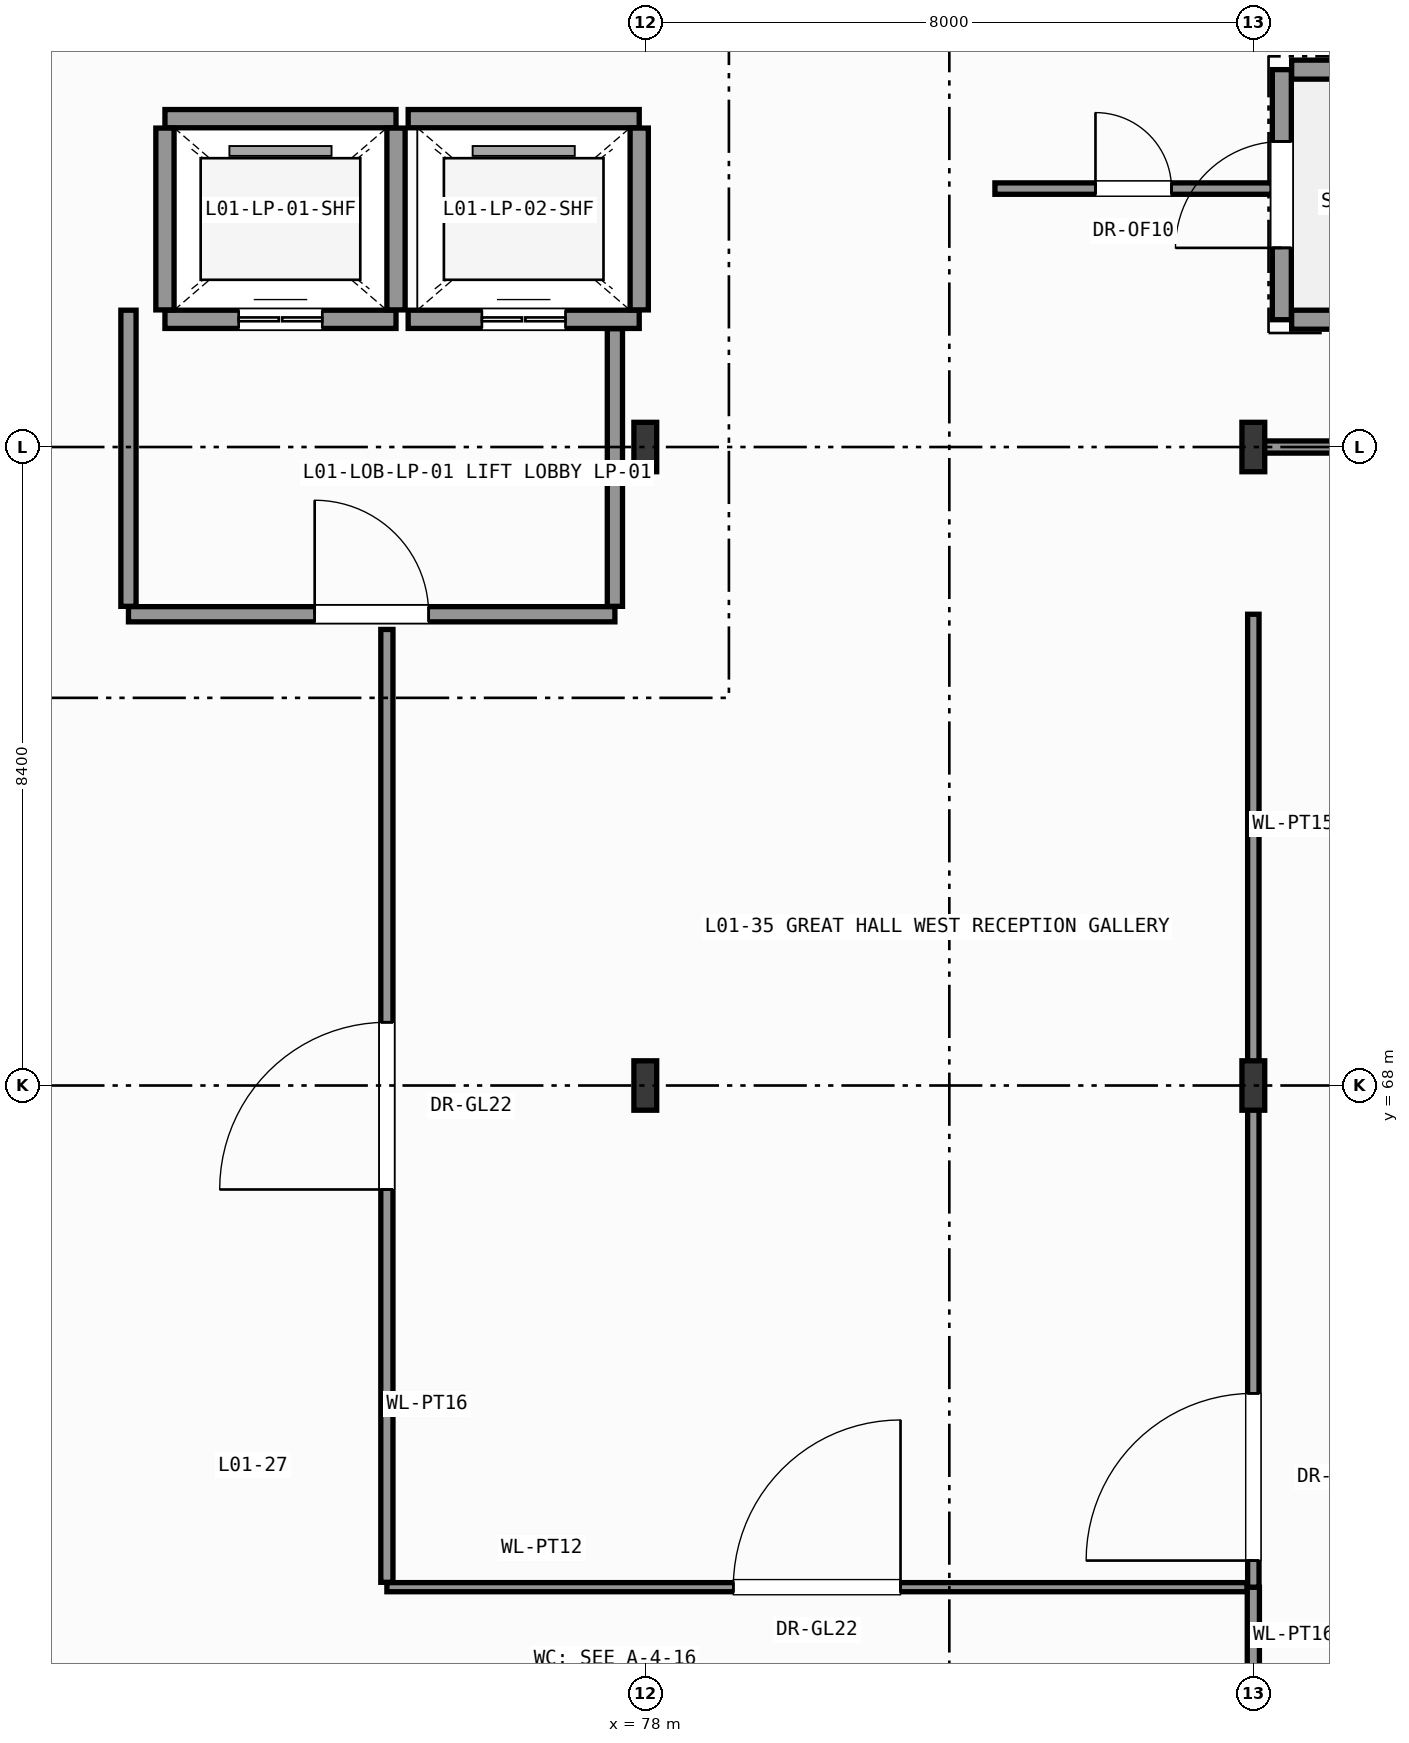
"""IFC4 building model, lengths in metres.
Left out: names, types, materials, properties, quantities, classifications, styles, units other than length and angle.
Written with IfcOpenShell. Run it as: python <this file> out.ifc"""

import sys

from ifc_helpers import new_model, si_unit, direction, frame, frame_2d, origin, origin_2d, place, context, subcontext, project, spatial, rectangle, i_section, extrude, element, fill, save


model = new_model("IFC4")
c1 = context("Model", 3, precision=1e-05, world=origin(), true_north=direction((0.0, 1.0)))
c2 = subcontext(c1, "Body", "Model", "MODEL_VIEW")
j1 = project(units=[si_unit("LENGTHUNIT", "METRE"), si_unit("PLANEANGLEUNIT", "RADIAN")], contexts=[c1])
p1 = place(None, origin())
s1 = spatial("IfcSite", under=j1, at=p1, CompositionType="ELEMENT")
p2 = place(p1, origin())
s2 = spatial("IfcBuilding", under=s1, at=p2, CompositionType="ELEMENT")
p3 = place(p2, origin())
s3 = spatial("IfcBuildingStorey", under=s2, at=p3, CompositionType="ELEMENT", Elevation=0.0)
for number, where, z_axis, x_axis in (
    (1, (78.0, 68.0, 0.0), (0.0, 0.0, 1.0), (1.0, 0.0, 0.0)),
    (2, (78.0, 76.4, 0.0), (0.0, 0.0, 1.0), (1.0, 0.0, 0.0)),
    (3, (86.0, 68.0, 0.0), (0.0, 0.0, 1.0), (1.0, 0.0, 0.0)),
    (4, (86.0, 76.4, 0.0), (0.0, 0.0, 1.0), (1.0, 0.0, 0.0)),
):
    element("IfcColumn", number, at=place(p3, frame(where, z_axis=z_axis, x_axis=x_axis)), inside=s3, PredefinedType="COLUMN", context=c2, shape_type="SweptSolid", body=[
        extrude(i_section(OverallWidth=0.3, OverallDepth=0.65, WebThickness=0.016, FlangeThickness=0.031, FilletRadius=0.027, at=origin_2d()), origin(), (0.0, 0.0, 1.0), 7.8),
    ])
p4 = place(p3, frame((86.375, 78.075, 0.0), z_axis=(0.0, 0.0, 1.0), x_axis=(0.0, 1.0, 0.0)))
e5 = element("IfcWall", 5, at=p4, inside=s3, PredefinedType="SHEAR", context=c2, shape_type="SweptSolid", body=[
    extrude(rectangle(XDim=3.29, YDim=0.25, at=frame_2d((1.645, 0.0))), origin(), (0.0, 0.0, 1.0), 7.54),
])
p5 = place(p4, frame((0.945, 0.0, 0.0)))
e6 = element("IfcOpeningElement", 6, at=p5, cuts=e5, PredefinedType="OPENING", context=c2, shape_type="SweptSolid", body=[
    extrude(rectangle(XDim=1.4, YDim=2.2, at=frame_2d((0.7, 1.1))), frame((0.0, 0.135, 0.0), z_axis=(0.0, -1.0, 0.0), x_axis=(1.0, 0.0, 0.0)), (0.0, 0.0, 1.0), 0.27),
])
for number, where, z_axis, x_axis in (
    (7, (86.504, 78.075, 0.0), (0.0, 0.0, 1.0), (1.0, 0.0, 0.0)),
    (8, (86.504, 81.365, 0.0), (0.0, 0.0, 1.0), (1.0, 0.0, 0.0)),
):
    element("IfcWall", number, at=place(p3, frame(where, z_axis=z_axis, x_axis=x_axis)), inside=s3, PredefinedType="SHEAR", context=c2, shape_type="SweptSolid", body=[
        extrude(rectangle(XDim=6.892, YDim=0.25, at=frame_2d((3.446, 0.0))), origin(), (0.0, 0.0, 1.0), 7.54),
    ])
p6 = place(p3, frame((71.68, 78.08, 0.0), z_axis=(0.0, 0.0, 1.0), x_axis=(1.0, 0.0, 0.0)))
e9 = element("IfcWall", 9, at=p6, inside=s3, PredefinedType="SHEAR", context=c2, shape_type="SweptSolid", body=[
    extrude(rectangle(XDim=3.04, YDim=0.24, at=frame_2d((1.52, 0.0))), origin(), (0.0, 0.0, 1.0), 7.54),
])
p7 = place(p6, frame((0.97, 0.0, 0.0)))
e10 = element("IfcOpeningElement", 10, at=p7, cuts=e9, PredefinedType="OPENING", context=c2, shape_type="SweptSolid", body=[
    extrude(rectangle(XDim=1.1, YDim=2.2, at=frame_2d((0.55, 1.1))), frame((0.0, 0.13, 0.0), z_axis=(0.0, -1.0, 0.0), x_axis=(1.0, 0.0, 0.0)), (0.0, 0.0, 1.0), 0.26),
])
p8 = place(p3, frame((71.68, 80.72, 0.0), z_axis=(0.0, 0.0, 1.0), x_axis=(1.0, 0.0, 0.0)))
e11 = element("IfcWall", 11, at=p8, inside=s3, PredefinedType="SHEAR", context=c2, shape_type="SweptSolid", body=[
    extrude(rectangle(XDim=3.04, YDim=0.24, at=frame_2d((1.52, 0.0))), origin(), (0.0, 0.0, 1.0), 7.54),
])
for number, where, z_axis, x_axis in (
    (12, (71.68, 78.204, 0.0), (0.0, 0.0, 1.0), (0.0, 1.0, 0.0)),
    (13, (74.72, 78.204, 0.0), (0.0, 0.0, 1.0), (0.0, 1.0, 0.0)),
):
    element("IfcWall", number, at=place(p3, frame(where, z_axis=z_axis, x_axis=x_axis)), inside=s3, PredefinedType="SHEAR", context=c2, shape_type="SweptSolid", body=[
        extrude(rectangle(XDim=2.392, YDim=0.24, at=frame_2d((1.196, 0.0))), origin(), (0.0, 0.0, 1.0), 7.54),
    ])
p9 = place(p3, frame((74.88, 78.08, 0.0), z_axis=(0.0, 0.0, 1.0), x_axis=(1.0, 0.0, 0.0)))
e14 = element("IfcWall", 14, at=p9, inside=s3, PredefinedType="SHEAR", context=c2, shape_type="SweptSolid", body=[
    extrude(rectangle(XDim=3.04, YDim=0.24, at=frame_2d((1.52, 0.0))), origin(), (0.0, 0.0, 1.0), 7.54),
])
p10 = place(p9, frame((0.97, 0.0, 0.0)))
e15 = element("IfcOpeningElement", 15, at=p10, cuts=e14, PredefinedType="OPENING", context=c2, shape_type="SweptSolid", body=[
    extrude(rectangle(XDim=1.1, YDim=2.2, at=frame_2d((0.55, 1.1))), frame((0.0, 0.13, 0.0), z_axis=(0.0, -1.0, 0.0), x_axis=(1.0, 0.0, 0.0)), (0.0, 0.0, 1.0), 0.26),
])
p11 = place(p3, frame((74.88, 80.72, 0.0), z_axis=(0.0, 0.0, 1.0), x_axis=(1.0, 0.0, 0.0)))
e16 = element("IfcWall", 16, at=p11, inside=s3, PredefinedType="SHEAR", context=c2, shape_type="SweptSolid", body=[
    extrude(rectangle(XDim=3.04, YDim=0.24, at=frame_2d((1.52, 0.0))), origin(), (0.0, 0.0, 1.0), 7.54),
])
p12 = place(p3, frame((77.92, 78.204, 0.0), z_axis=(0.0, 0.0, 1.0), x_axis=(0.0, 1.0, 0.0)))
e17 = element("IfcWall", 17, at=p12, inside=s3, PredefinedType="SHEAR", context=c2, shape_type="SweptSolid", body=[
    extrude(rectangle(XDim=2.392, YDim=0.24, at=frame_2d((1.196, 0.0))), origin(), (0.0, 0.0, 1.0), 7.54),
])
p13 = place(p3, frame((71.2, 74.2, 0.0), z_axis=(0.0, 0.0, 1.0), x_axis=(1.0, 0.0, 0.0)))
e18 = element("IfcWall", 18, at=p13, inside=s3, PredefinedType="PARTITIONING", context=c2, shape_type="SweptSolid", body=[
    extrude(rectangle(XDim=6.4, YDim=0.2, at=frame_2d((3.2, 0.0))), origin(), (0.0, 0.0, 1.0), 7.54),
])
p14 = place(p13, frame((2.45, 0.0, 0.0)))
e19 = element("IfcOpeningElement", 19, at=p14, cuts=e18, PredefinedType="OPENING", context=c2, shape_type="SweptSolid", body=[
    extrude(rectangle(XDim=1.5, YDim=2.2, at=frame_2d((0.75, 1.1))), frame((0.0, 0.11, 0.0), z_axis=(0.0, -1.0, 0.0), x_axis=(1.0, 0.0, 0.0)), (0.0, 0.0, 1.0), 0.22),
])
p15 = place(p3, frame((71.2, 74.304, 0.0), z_axis=(0.0, 0.0, 1.0), x_axis=(0.0, 1.0, 0.0)))
e20 = element("IfcWall", 20, at=p15, inside=s3, PredefinedType="PARTITIONING", context=c2, shape_type="SweptSolid", body=[
    extrude(rectangle(XDim=3.896, YDim=0.2, at=frame_2d((1.948, 0.0))), origin(), (0.0, 0.0, 1.0), 7.54),
])
p16 = place(p3, frame((77.6, 74.304, 0.0), z_axis=(0.0, 0.0, 1.0), x_axis=(0.0, 1.0, 0.0)))
e21 = element("IfcWall", 21, at=p16, inside=s3, PredefinedType="PARTITIONING", context=c2, shape_type="SweptSolid", body=[
    extrude(rectangle(XDim=3.652, YDim=0.2, at=frame_2d((1.826, 0.0))), origin(), (0.0, 0.0, 1.0), 7.54),
])
p17 = place(p3, frame((86.0, 59.6, 0.0), z_axis=(0.0, 0.0, 1.0), x_axis=(0.0, 1.0, 0.0)))
e22 = element("IfcWall", 22, at=p17, inside=s3, PredefinedType="PARTITIONING", context=c2, shape_type="SweptSolid", body=[
    extrude(rectangle(XDim=1.8, YDim=0.16, at=frame_2d((0.9, 0.0))), origin(), (0.0, 0.0, 1.0), 7.085),
])
p18 = place(p3, frame((86.0, 76.4, 0.0), z_axis=(0.0, 0.0, 1.0), x_axis=(1.0, 0.0, 0.0)))
e23 = element("IfcWall", 23, at=p18, inside=s3, PredefinedType="PARTITIONING", context=c2, shape_type="SweptSolid", body=[
    extrude(rectangle(XDim=23.936, YDim=0.16, at=frame_2d((11.968, 0.0))), origin(), (0.0, 0.0, 1.0), 7.135),
])
p19 = place(p18, frame((10.868, 0.0, 0.0)))
e24 = element("IfcOpeningElement", 24, at=p19, cuts=e23, PredefinedType="OPENING", context=c2, shape_type="SweptSolid", body=[
    extrude(rectangle(XDim=2.2, YDim=2.6, at=frame_2d((1.1, 1.3))), frame((0.0, 0.09, 0.0), z_axis=(0.0, -1.0, 0.0), x_axis=(1.0, 0.0, 0.0)), (0.0, 0.0, 1.0), 0.18),
])
p20 = place(p3, frame((86.0, 61.4, 0.0), z_axis=(0.0, 0.0, 1.0), x_axis=(0.0, 1.0, 0.0)))
e25 = element("IfcWall", 25, at=p20, inside=s3, PredefinedType="PARTITIONING", context=c2, shape_type="SweptSolid", body=[
    extrude(rectangle(XDim=12.8, YDim=0.15, at=frame_2d((6.4, 0.0))), origin(), (0.0, 0.0, 1.0), 7.085),
])
p21 = place(p20, frame((0.35, 0.0, 0.0)))
e26 = element("IfcOpeningElement", 26, at=p21, cuts=e25, PredefinedType="OPENING", context=c2, shape_type="SweptSolid", body=[
    extrude(rectangle(XDim=2.2, YDim=2.6, at=frame_2d((1.1, 1.3))), frame((0.0, 0.085, 0.0), z_axis=(0.0, -1.0, 0.0), x_axis=(1.0, 0.0, 0.0)), (0.0, 0.0, 1.0), 0.17),
])
p22 = place(p3, frame((74.6, 61.4, 0.0), z_axis=(0.0, 0.0, 1.0), x_axis=(1.0, 0.0, 0.0)))
e27 = element("IfcWall", 27, at=p22, inside=s3, PredefinedType="PARTITIONING", context=c2, shape_type="SweptSolid", body=[
    extrude(rectangle(XDim=11.316, YDim=0.12, at=frame_2d((5.658, 0.0))), origin(), (0.0, 0.0, 1.0), 7.54),
])
p23 = place(p22, frame((4.558, 0.0, 0.0)))
e28 = element("IfcOpeningElement", 28, at=p23, cuts=e27, PredefinedType="OPENING", context=c2, shape_type="SweptSolid", body=[
    extrude(rectangle(XDim=2.2, YDim=2.6, at=frame_2d((1.1, 1.3))), frame((0.0, 0.07, 0.0), z_axis=(0.0, -1.0, 0.0), x_axis=(1.0, 0.0, 0.0)), (0.0, 0.0, 1.0), 0.14),
])
p24 = place(p3, frame((74.6, 61.464, 0.0), z_axis=(0.0, 0.0, 1.0), x_axis=(0.0, 1.0, 0.0)))
e29 = element("IfcWall", 29, at=p24, inside=s3, PredefinedType="PARTITIONING", context=c2, shape_type="SweptSolid", body=[
    extrude(rectangle(XDim=12.536, YDim=0.16, at=frame_2d((6.268, 0.0))), origin(), (0.0, 0.0, 1.0), 7.54),
])
p25 = place(p24, frame((5.168, 0.0, 0.0)))
e30 = element("IfcOpeningElement", 30, at=p25, cuts=e29, PredefinedType="OPENING", context=c2, shape_type="SweptSolid", body=[
    extrude(rectangle(XDim=2.2, YDim=2.6, at=frame_2d((1.1, 1.3))), frame((0.0, 0.09, 0.0), z_axis=(0.0, -1.0, 0.0), x_axis=(1.0, 0.0, 0.0)), (0.0, 0.0, 1.0), 0.18),
])
p26 = place(p3, frame((82.6, 79.8, 0.0), z_axis=(0.0, 0.0, 1.0), x_axis=(1.0, 0.0, 0.0)))
e31 = element("IfcWall", 31, at=p26, inside=s3, PredefinedType="PARTITIONING", context=c2, shape_type="SweptSolid", body=[
    extrude(rectangle(XDim=3.646, YDim=0.15, at=frame_2d((1.823, 0.0))), origin(), (0.0, 0.0, 1.0), 7.195),
])
p27 = place(p26, frame((1.323, 0.0, 0.0)))
e32 = element("IfcOpeningElement", 32, at=p27, cuts=e31, PredefinedType="OPENING", context=c2, shape_type="SweptSolid", body=[
    extrude(rectangle(XDim=1.0, YDim=2.15, at=frame_2d((0.5, 1.075))), frame((0.0, 0.085, 0.0), z_axis=(0.0, -1.0, 0.0), x_axis=(1.0, 0.0, 0.0)), (0.0, 0.0, 1.0), 0.17),
])
p28 = place(p5, origin())
e33 = element("IfcDoor", 33, at=p28, inside=s3, OperationType="SINGLE_SWING_LEFT", PredefinedType="DOOR", context=c2, shape_type="SweptSolid", body=[
    extrude(rectangle(XDim=1.4, YDim=2.2, at=frame_2d((0.7, 1.1))), frame((0.0, 0.025, 0.0), z_axis=(0.0, -1.0, 0.0), x_axis=(1.0, 0.0, 0.0)), (0.0, 0.0, 1.0), 0.05),
])
fill(e6, e33)
p29 = place(p7, origin())
e34 = element("IfcDoor", 34, at=p29, inside=s3, OperationType="DOUBLE_DOOR_SLIDING", PredefinedType="DOOR", context=c2, shape_type="SweptSolid", body=[
    extrude(rectangle(XDim=1.1, YDim=2.2, at=frame_2d((0.55, 1.1))), frame((0.0, 0.025, 0.0), z_axis=(0.0, -1.0, 0.0), x_axis=(1.0, 0.0, 0.0)), (0.0, 0.0, 1.0), 0.05),
])
fill(e10, e34)
p30 = place(p10, origin())
e35 = element("IfcDoor", 35, at=p30, inside=s3, OperationType="DOUBLE_DOOR_SLIDING", PredefinedType="DOOR", context=c2, shape_type="SweptSolid", body=[
    extrude(rectangle(XDim=1.1, YDim=2.2, at=frame_2d((0.55, 1.1))), frame((0.0, 0.025, 0.0), z_axis=(0.0, -1.0, 0.0), x_axis=(1.0, 0.0, 0.0)), (0.0, 0.0, 1.0), 0.05),
])
fill(e15, e35)
p31 = place(p14, origin())
e36 = element("IfcDoor", 36, at=p31, inside=s3, OperationType="SINGLE_SWING_LEFT", PredefinedType="DOOR", context=c2, shape_type="SweptSolid", body=[
    extrude(rectangle(XDim=1.5, YDim=2.2, at=frame_2d((0.75, 1.1))), frame((0.0, 0.025, 0.0), z_axis=(0.0, -1.0, 0.0), x_axis=(1.0, 0.0, 0.0)), (0.0, 0.0, 1.0), 0.05),
])
fill(e19, e36)
p32 = place(p21, origin())
e37 = element("IfcDoor", 37, at=p32, inside=s3, OperationType="SINGLE_SWING_LEFT", PredefinedType="DOOR", context=c2, shape_type="SweptSolid", body=[
    extrude(rectangle(XDim=2.2, YDim=2.6, at=frame_2d((1.1, 1.3))), frame((0.0, 0.025, 0.0), z_axis=(0.0, -1.0, 0.0), x_axis=(1.0, 0.0, 0.0)), (0.0, 0.0, 1.0), 0.05),
])
fill(e26, e37)
p33 = place(p23, origin())
e38 = element("IfcDoor", 38, at=p33, inside=s3, OperationType="SINGLE_SWING_RIGHT", PredefinedType="DOOR", context=c2, shape_type="SweptSolid", body=[
    extrude(rectangle(XDim=2.2, YDim=2.6, at=frame_2d((1.1, 1.3))), frame((0.0, 0.025, 0.0), z_axis=(0.0, -1.0, 0.0), x_axis=(1.0, 0.0, 0.0)), (0.0, 0.0, 1.0), 0.05),
])
fill(e28, e38)
p34 = place(p25, origin())
e39 = element("IfcDoor", 39, at=p34, inside=s3, OperationType="SINGLE_SWING_LEFT", PredefinedType="DOOR", context=c2, shape_type="SweptSolid", body=[
    extrude(rectangle(XDim=2.2, YDim=2.6, at=frame_2d((1.1, 1.3))), frame((0.0, 0.025, 0.0), z_axis=(0.0, -1.0, 0.0), x_axis=(1.0, 0.0, 0.0)), (0.0, 0.0, 1.0), 0.05),
])
fill(e30, e39)
p35 = place(p27, origin())
e40 = element("IfcDoor", 40, at=p35, inside=s3, OperationType="SINGLE_SWING_LEFT", PredefinedType="DOOR", context=c2, shape_type="SweptSolid", body=[
    extrude(rectangle(XDim=1.0, YDim=2.15, at=frame_2d((0.5, 1.075))), frame((0.0, 0.025, 0.0), z_axis=(0.0, -1.0, 0.0), x_axis=(1.0, 0.0, 0.0)), (0.0, 0.0, 1.0), 0.05),
])
fill(e32, e40)
save(model, sys.argv[1])
